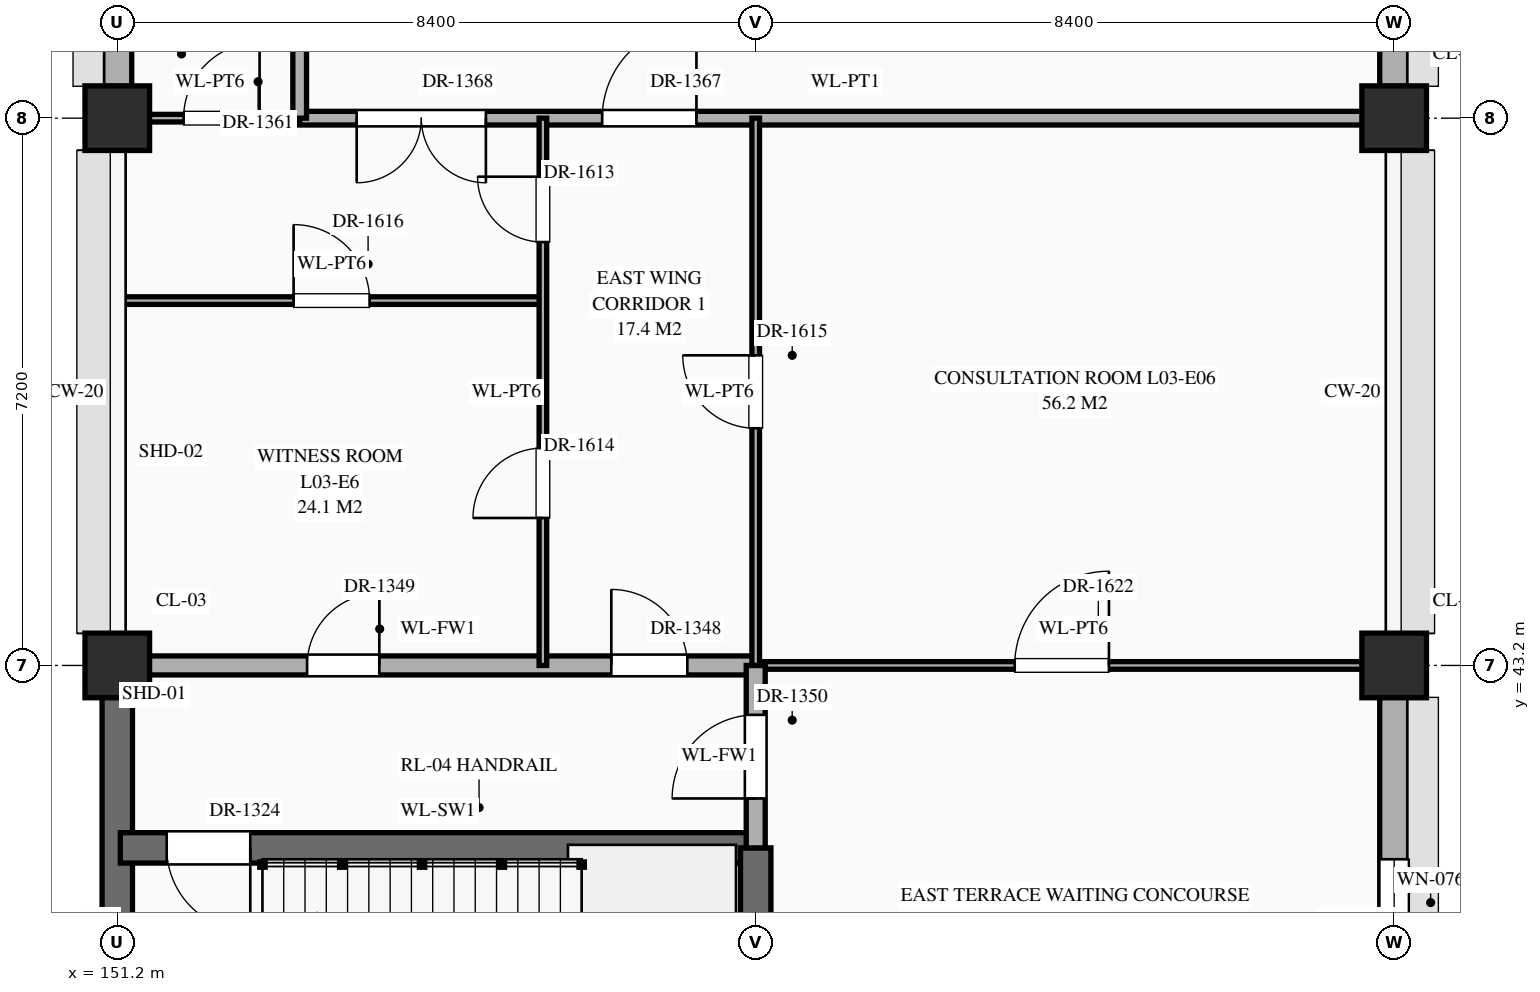
"""IFC4 building model, lengths in metres.
Left out: names, types, materials, properties, quantities, classifications, styles, units other than length and angle.
Written with IfcOpenShell. Run it as: python <this file> out.ifc"""

import sys

from ifc_helpers import new_model, si_unit, direction, frame, frame_2d, origin, origin_2d, place, context, subcontext, project, spatial, rectangle, extrude, element, fill, save


model = new_model("IFC4")
c1 = context("Model", 3, precision=1e-05, world=origin(), true_north=direction((0.0, 1.0)))
c2 = subcontext(c1, "Body", "Model", "MODEL_VIEW")
j1 = project(units=[si_unit("LENGTHUNIT", "METRE"), si_unit("PLANEANGLEUNIT", "RADIAN")], contexts=[c1])
p1 = place(None, origin())
s1 = spatial("IfcSite", under=j1, at=p1, CompositionType="ELEMENT")
p2 = place(p1, origin())
s2 = spatial("IfcBuilding", under=s1, at=p2, CompositionType="ELEMENT")
p3 = place(p2, frame((0.0, 0.0, 10.8)))
s3 = spatial("IfcBuildingStorey", under=s2, at=p3, CompositionType="ELEMENT", Elevation=10.8)
for number, where, z_axis, x_axis in (
    (1, (151.2, 43.2, 0.0), (0.0, 0.0, 1.0), (1.0, 0.0, 0.0)),
    (2, (151.2, 50.4, 0.0), (0.0, 0.0, 1.0), (1.0, 0.0, 0.0)),
    (3, (168.0, 43.2, 0.0), (0.0, 0.0, 1.0), (1.0, 0.0, 0.0)),
    (4, (168.0, 50.4, 0.0), (0.0, 0.0, 1.0), (1.0, 0.0, 0.0)),
):
    element("IfcColumn", number, at=place(p3, frame(where, z_axis=z_axis, x_axis=x_axis)), inside=s3, PredefinedType="COLUMN", context=c2, shape_type="SweptSolid", body=[
        extrude(rectangle(XDim=0.85, YDim=0.85, at=origin_2d()), origin(), (0.0, 0.0, 1.0), 5.4),
    ])
p4 = place(p3, frame((151.2, 36.42, 0.0), z_axis=(0.0, 0.0, 1.0), x_axis=(0.0, 1.0, 0.0)))
e5 = element("IfcWall", 5, at=p4, inside=s3, PredefinedType="SHEAR", context=c2, shape_type="SweptSolid", body=[
    extrude(rectangle(XDim=6.36, YDim=0.4, at=frame_2d((3.18, 0.0))), origin(), (0.0, 0.0, 1.0), 5.12),
])
p5 = place(p3, frame((151.2, 50.82, 0.0), z_axis=(0.0, 0.0, 1.0), x_axis=(0.0, 1.0, 0.0)))
e6 = element("IfcWall", 6, at=p5, inside=s3, PredefinedType="STANDARD", context=c2, shape_type="SweptSolid", body=[
    extrude(rectangle(XDim=6.36, YDim=0.38, at=frame_2d((3.18, 0.0))), origin(), (0.0, 0.0, 1.0), 4.47),
])
p6 = place(p5, frame((2.73, 0.0, 0.85)))
e7 = element("IfcOpeningElement", 7, at=p6, cuts=e6, PredefinedType="OPENING", context=c2, shape_type="SweptSolid", body=[
    extrude(rectangle(XDim=0.9, YDim=1.56, at=frame_2d((0.45, 0.78))), frame((0.0, 0.202, 0.0), z_axis=(0.0, -1.0, 0.0), x_axis=(1.0, 0.0, 0.0)), (0.0, 0.0, 1.0), 0.404),
])
p7 = place(p3, frame((168.0, 36.42, 0.0), z_axis=(0.0, 0.0, 1.0), x_axis=(0.0, 1.0, 0.0)))
e8 = element("IfcWall", 8, at=p7, inside=s3, PredefinedType="STANDARD", context=c2, shape_type="SweptSolid", body=[
    extrude(rectangle(XDim=6.36, YDim=0.38, at=frame_2d((3.18, 0.0))), origin(), (0.0, 0.0, 1.0), 4.47),
])
p8 = place(p7, frame((2.13, 0.0, 0.85)))
e9 = element("IfcOpeningElement", 9, at=p8, cuts=e8, PredefinedType="OPENING", context=c2, shape_type="SweptSolid", body=[
    extrude(rectangle(XDim=2.1, YDim=1.92, at=frame_2d((1.05, 0.96))), frame((0.0, 0.202, 0.0), z_axis=(0.0, -1.0, 0.0), x_axis=(1.0, 0.0, 0.0)), (0.0, 0.0, 1.0), 0.404),
])
p9 = place(p3, frame((168.0, 50.82, 0.0), z_axis=(0.0, 0.0, 1.0), x_axis=(0.0, 1.0, 0.0)))
e10 = element("IfcWall", 10, at=p9, inside=s3, PredefinedType="STANDARD", context=c2, shape_type="SweptSolid", body=[
    extrude(rectangle(XDim=6.36, YDim=0.38, at=frame_2d((3.18, 0.0))), origin(), (0.0, 0.0, 1.0), 4.47),
])
p10 = place(p9, frame((2.73, 0.0, 0.85)))
e11 = element("IfcOpeningElement", 11, at=p10, cuts=e10, PredefinedType="OPENING", context=c2, shape_type="SweptSolid", body=[
    extrude(rectangle(XDim=0.9, YDim=1.2, at=frame_2d((0.45, 0.6))), frame((0.0, 0.202, 0.0), z_axis=(0.0, -1.0, 0.0), x_axis=(1.0, 0.0, 0.0)), (0.0, 0.0, 1.0), 0.404),
])
p11 = place(p3, frame((151.24, 40.8, 0.0), z_axis=(0.0, 0.0, 1.0), x_axis=(1.0, 0.0, 0.0)))
e12 = element("IfcWall", 12, at=p11, inside=s3, PredefinedType="SHEAR", context=c2, shape_type="SweptSolid", body=[
    extrude(rectangle(XDim=8.36, YDim=0.4, at=frame_2d((4.18, 0.0))), origin(), (0.0, 0.0, 1.0), 5.12),
])
p12 = place(p11, frame((0.61, 0.0, 0.0)))
e13 = element("IfcOpeningElement", 13, at=p12, cuts=e12, PredefinedType="OPENING", context=c2, shape_type="SweptSolid", body=[
    extrude(rectangle(XDim=1.1, YDim=2.2, at=frame_2d((0.55, 1.1))), frame((0.0, 0.212, 0.0), z_axis=(0.0, -1.0, 0.0), x_axis=(1.0, 0.0, 0.0)), (0.0, 0.0, 1.0), 0.424),
])
p13 = place(p3, frame((151.24, 43.2, 0.0), z_axis=(0.0, 0.0, 1.0), x_axis=(1.0, 0.0, 0.0)))
e14 = element("IfcWall", 14, at=p13, inside=s3, PredefinedType="STANDARD", context=c2, shape_type="SweptSolid", body=[
    extrude(rectangle(XDim=8.36, YDim=0.25, at=frame_2d((4.18, 0.0))), origin(), (0.0, 0.0, 1.0), 4.07),
])
p14 = place(p13, frame((6.46, 0.0, 0.0)))
e15 = element("IfcOpeningElement", 15, at=p14, cuts=e14, PredefinedType="OPENING", context=c2, shape_type="SweptSolid", body=[
    extrude(rectangle(XDim=1.0, YDim=2.2, at=frame_2d((0.5, 1.1))), frame((0.0, 0.137, 0.0), z_axis=(0.0, -1.0, 0.0), x_axis=(1.0, 0.0, 0.0)), (0.0, 0.0, 1.0), 0.274),
])
p15 = place(p13, frame((2.458, 0.0, 0.0)))
e16 = element("IfcOpeningElement", 16, at=p15, cuts=e14, PredefinedType="OPENING", context=c2, shape_type="SweptSolid", body=[
    extrude(rectangle(XDim=0.95, YDim=2.15, at=frame_2d((0.475, 1.075))), frame((0.0, 0.137, 0.0), z_axis=(0.0, -1.0, 0.0), x_axis=(1.0, 0.0, 0.0)), (0.0, 0.0, 1.0), 0.274),
])
p16 = place(p3, frame((159.6, 43.2, 0.0), z_axis=(0.0, 0.0, 1.0), x_axis=(1.0, 0.0, 0.0)))
e17 = element("IfcWall", 17, at=p16, inside=s3, PredefinedType="STANDARD", context=c2, shape_type="SweptSolid", body=[
    extrude(rectangle(XDim=8.36, YDim=0.1, at=frame_2d((4.18, 0.0))), origin(), (0.0, 0.0, 1.0), 4.07),
])
p17 = place(p16, frame((3.407, 0.0, 0.0)))
e18 = element("IfcOpeningElement", 18, at=p17, cuts=e17, PredefinedType="OPENING", context=c2, shape_type="SweptSolid", body=[
    extrude(rectangle(XDim=1.24, YDim=2.3, at=frame_2d((0.62, 1.15))), frame((0.0, 0.062, 0.0), z_axis=(0.0, -1.0, 0.0), x_axis=(1.0, 0.0, 0.0)), (0.0, 0.0, 1.0), 0.124),
])
p18 = place(p3, frame((151.24, 48.0, 0.0), z_axis=(0.0, 0.0, 1.0), x_axis=(1.0, 0.0, 0.0)))
e19 = element("IfcWall", 19, at=p18, inside=s3, PredefinedType="STANDARD", context=c2, shape_type="SweptSolid", body=[
    extrude(rectangle(XDim=5.56, YDim=0.1, at=frame_2d((2.78, 0.0))), origin(), (0.0, 0.0, 1.0), 5.12),
])
p19 = place(p18, frame((2.28, 0.0, 0.0)))
e20 = element("IfcOpeningElement", 20, at=p19, cuts=e19, PredefinedType="OPENING", context=c2, shape_type="SweptSolid", body=[
    extrude(rectangle(XDim=1.0, YDim=2.25, at=frame_2d((0.5, 1.125))), frame((0.0, 0.062, 0.0), z_axis=(0.0, -1.0, 0.0), x_axis=(1.0, 0.0, 0.0)), (0.0, 0.0, 1.0), 0.124),
])
p20 = place(p3, frame((151.24, 50.4, 0.0), z_axis=(0.0, 0.0, 1.0), x_axis=(1.0, 0.0, 0.0)))
e21 = element("IfcWall", 21, at=p20, inside=s3, PredefinedType="STANDARD", context=c2, shape_type="SweptSolid", body=[
    extrude(rectangle(XDim=2.36, YDim=0.1, at=frame_2d((1.18, 0.0))), origin(), (0.0, 0.0, 1.0), 4.07),
])
p21 = place(p20, frame((0.833, 0.0, 0.0)))
e22 = element("IfcOpeningElement", 22, at=p21, cuts=e21, PredefinedType="OPENING", context=c2, shape_type="SweptSolid", body=[
    extrude(rectangle(XDim=1.0, YDim=2.25, at=frame_2d((0.5, 1.125))), frame((0.0, 0.062, 0.0), z_axis=(0.0, -1.0, 0.0), x_axis=(1.0, 0.0, 0.0)), (0.0, 0.0, 1.0), 0.124),
])
p22 = place(p3, frame((153.6, 50.4, 0.0), z_axis=(0.0, 0.0, 1.0), x_axis=(1.0, 0.0, 0.0)))
e23 = element("IfcWall", 23, at=p22, inside=s3, PredefinedType="STANDARD", context=c2, shape_type="SweptSolid", body=[
    extrude(rectangle(XDim=14.36, YDim=0.18, at=frame_2d((7.18, 0.0))), origin(), (0.0, 0.0, 1.0), 4.07),
])
p23 = place(p22, frame((3.98, 0.0, 0.0)))
e24 = element("IfcOpeningElement", 24, at=p23, cuts=e23, PredefinedType="OPENING", context=c2, shape_type="SweptSolid", body=[
    extrude(rectangle(XDim=1.24, YDim=2.3, at=frame_2d((0.62, 1.15))), frame((0.0, 0.102, 0.0), z_axis=(0.0, -1.0, 0.0), x_axis=(1.0, 0.0, 0.0)), (0.0, 0.0, 1.0), 0.204),
])
p24 = place(p22, frame((0.75, 0.0, 0.0)))
e25 = element("IfcOpeningElement", 25, at=p24, cuts=e23, PredefinedType="OPENING", context=c2, shape_type="SweptSolid", body=[
    extrude(rectangle(XDim=1.7, YDim=2.45, at=frame_2d((0.85, 1.225))), frame((0.0, 0.102, 0.0), z_axis=(0.0, -1.0, 0.0), x_axis=(1.0, 0.0, 0.0)), (0.0, 0.0, 1.0), 0.204),
])
p25 = place(p3, frame((153.6, 50.4, 0.0), z_axis=(0.0, 0.0, 1.0), x_axis=(0.0, 1.0, 0.0)))
e26 = element("IfcWall", 26, at=p25, inside=s3, PredefinedType="STANDARD", context=c2, shape_type="SweptSolid", body=[
    extrude(rectangle(XDim=14.4, YDim=0.18, at=frame_2d((7.2, 0.0))), origin(), (0.0, 0.0, 1.0), 5.12),
])
p26 = place(p25, frame((6.375, 0.0, 0.0)))
e27 = element("IfcOpeningElement", 27, at=p26, cuts=e26, PredefinedType="OPENING", context=c2, shape_type="SweptSolid", body=[
    extrude(rectangle(XDim=1.65, YDim=2.4, at=frame_2d((0.825, 1.2))), frame((0.0, 0.102, 0.0), z_axis=(0.0, -1.0, 0.0), x_axis=(1.0, 0.0, 0.0)), (0.0, 0.0, 1.0), 0.204),
])
p27 = place(p3, frame((156.8, 43.2, 0.0), z_axis=(0.0, 0.0, 1.0), x_axis=(0.0, 1.0, 0.0)))
e28 = element("IfcWall", 28, at=p27, inside=s3, PredefinedType="STANDARD", context=c2, shape_type="SweptSolid", body=[
    extrude(rectangle(XDim=7.2, YDim=0.1, at=frame_2d((3.6, 0.0))), origin(), (0.0, 0.0, 1.0), 5.12),
])
p28 = place(p27, frame((5.57, 0.0, 0.0)))
e29 = element("IfcOpeningElement", 29, at=p28, cuts=e28, PredefinedType="OPENING", context=c2, shape_type="SweptSolid", body=[
    extrude(rectangle(XDim=0.86, YDim=2.1, at=frame_2d((0.43, 1.05))), frame((0.0, 0.062, 0.0), z_axis=(0.0, -1.0, 0.0), x_axis=(1.0, 0.0, 0.0)), (0.0, 0.0, 1.0), 0.124),
])
p29 = place(p27, frame((1.94, 0.0, 0.0)))
e30 = element("IfcOpeningElement", 30, at=p29, cuts=e28, PredefinedType="OPENING", context=c2, shape_type="SweptSolid", body=[
    extrude(rectangle(XDim=0.92, YDim=2.15, at=frame_2d((0.46, 1.075))), frame((0.0, 0.062, 0.0), z_axis=(0.0, -1.0, 0.0), x_axis=(1.0, 0.0, 0.0)), (0.0, 0.0, 1.0), 0.124),
])
p30 = place(p3, frame((159.6, 36.04, 0.0), z_axis=(0.0, 0.0, 1.0), x_axis=(0.0, 1.0, 0.0)))
e31 = element("IfcWall", 31, at=p30, inside=s3, PredefinedType="SHEAR", context=c2, shape_type="SweptSolid", body=[
    extrude(rectangle(XDim=4.76, YDim=0.4, at=frame_2d((2.38, 0.0))), origin(), (0.0, 0.0, 1.0), 5.12),
])
p31 = place(p3, frame((159.6, 40.8, 0.0), z_axis=(0.0, 0.0, 1.0), x_axis=(0.0, 1.0, 0.0)))
e32 = element("IfcWall", 32, at=p31, inside=s3, PredefinedType="STANDARD", context=c2, shape_type="SweptSolid", body=[
    extrude(rectangle(XDim=2.4, YDim=0.25, at=frame_2d((1.2, 0.0))), origin(), (0.0, 0.0, 1.0), 5.12),
])
p32 = place(p31, frame((0.65, 0.0, 0.0)))
e33 = element("IfcOpeningElement", 33, at=p32, cuts=e32, PredefinedType="OPENING", context=c2, shape_type="SweptSolid", body=[
    extrude(rectangle(XDim=1.1, YDim=2.2, at=frame_2d((0.55, 1.1))), frame((0.0, 0.137, 0.0), z_axis=(0.0, -1.0, 0.0), x_axis=(1.0, 0.0, 0.0)), (0.0, 0.0, 1.0), 0.274),
])
p33 = place(p3, frame((159.6, 43.2, 0.0), z_axis=(0.0, 0.0, 1.0), x_axis=(0.0, 1.0, 0.0)))
e34 = element("IfcWall", 34, at=p33, inside=s3, PredefinedType="STANDARD", context=c2, shape_type="SweptSolid", body=[
    extrude(rectangle(XDim=7.2, YDim=0.1, at=frame_2d((3.6, 0.0))), origin(), (0.0, 0.0, 1.0), 5.12),
])
p34 = place(p33, frame((3.12, 0.0, 0.0)))
e35 = element("IfcOpeningElement", 35, at=p34, cuts=e34, PredefinedType="OPENING", context=c2, shape_type="SweptSolid", body=[
    extrude(rectangle(XDim=0.96, YDim=2.2, at=frame_2d((0.48, 1.1))), frame((0.0, 0.062, 0.0), z_axis=(0.0, -1.0, 0.0), x_axis=(1.0, 0.0, 0.0)), (0.0, 0.0, 1.0), 0.124),
])
p35 = place(p8, origin())
e36 = element("IfcWindow", 36, at=p35, inside=s3, PartitioningType="SINGLE_PANEL", PredefinedType="WINDOW", context=c2, shape_type="SweptSolid", body=[
    extrude(rectangle(XDim=2.1, YDim=1.92, at=frame_2d((1.05, 0.96))), frame((0.0, 0.03, 0.0), z_axis=(0.0, -1.0, 0.0), x_axis=(1.0, 0.0, 0.0)), (0.0, 0.0, 1.0), 0.06),
])
fill(e9, e36)
p36 = place(p12, frame((1.1, 0.0, 0.0), z_axis=(0.0, 0.0, 1.0), x_axis=(-1.0, 0.0, 0.0)))
e37 = element("IfcDoor", 37, at=p36, inside=s3, OperationType="SINGLE_SWING_LEFT", PredefinedType="DOOR", context=c2, shape_type="SweptSolid", body=[
    extrude(rectangle(XDim=1.1, YDim=2.2, at=frame_2d((0.55, 1.1))), frame((0.0, 0.025, 0.0), z_axis=(0.0, -1.0, 0.0), x_axis=(1.0, 0.0, 0.0)), (0.0, 0.0, 1.0), 0.05),
])
fill(e13, e37)
p37 = place(p14, origin())
e38 = element("IfcDoor", 38, at=p37, inside=s3, OperationType="SINGLE_SWING_LEFT", PredefinedType="DOOR", context=c2, shape_type="SweptSolid", body=[
    extrude(rectangle(XDim=1.0, YDim=2.2, at=frame_2d((0.5, 1.1))), frame((0.0, 0.025, 0.0), z_axis=(0.0, -1.0, 0.0), x_axis=(1.0, 0.0, 0.0)), (0.0, 0.0, 1.0), 0.05),
])
fill(e15, e38)
p38 = place(p15, origin())
e39 = element("IfcDoor", 39, at=p38, inside=s3, OperationType="SINGLE_SWING_RIGHT", PredefinedType="DOOR", context=c2, shape_type="SweptSolid", body=[
    extrude(rectangle(XDim=0.95, YDim=2.15, at=frame_2d((0.475, 1.075))), frame((0.0, 0.025, 0.0), z_axis=(0.0, -1.0, 0.0), x_axis=(1.0, 0.0, 0.0)), (0.0, 0.0, 1.0), 0.05),
])
fill(e16, e39)
p39 = place(p32, origin())
e40 = element("IfcDoor", 40, at=p39, inside=s3, OperationType="SINGLE_SWING_LEFT", PredefinedType="DOOR", context=c2, shape_type="SweptSolid", body=[
    extrude(rectangle(XDim=1.1, YDim=2.2, at=frame_2d((0.55, 1.1))), frame((0.0, 0.025, 0.0), z_axis=(0.0, -1.0, 0.0), x_axis=(1.0, 0.0, 0.0)), (0.0, 0.0, 1.0), 0.05),
])
fill(e33, e40)
p40 = place(p21, origin())
e41 = element("IfcDoor", 41, at=p40, inside=s3, OperationType="SINGLE_SWING_RIGHT", PredefinedType="DOOR", context=c2, shape_type="SweptSolid", body=[
    extrude(rectangle(XDim=1.0, YDim=2.25, at=frame_2d((0.5, 1.125))), frame((0.0, 0.025, 0.0), z_axis=(0.0, -1.0, 0.0), x_axis=(1.0, 0.0, 0.0)), (0.0, 0.0, 1.0), 0.05),
])
fill(e22, e41)
p41 = place(p23, origin())
e42 = element("IfcDoor", 42, at=p41, inside=s3, OperationType="SINGLE_SWING_RIGHT", PredefinedType="DOOR", context=c2, shape_type="SweptSolid", body=[
    extrude(rectangle(XDim=1.24, YDim=2.3, at=frame_2d((0.62, 1.15))), frame((0.0, 0.025, 0.0), z_axis=(0.0, -1.0, 0.0), x_axis=(1.0, 0.0, 0.0)), (0.0, 0.0, 1.0), 0.05),
])
fill(e24, e42)
p42 = place(p24, frame((1.7, 0.0, 0.0), z_axis=(0.0, 0.0, 1.0), x_axis=(-1.0, 0.0, 0.0)))
e43 = element("IfcDoor", 43, at=p42, inside=s3, OperationType="DOUBLE_DOOR_SINGLE_SWING", PredefinedType="DOOR", context=c2, shape_type="SweptSolid", body=[
    extrude(rectangle(XDim=1.7, YDim=2.45, at=frame_2d((0.85, 1.225))), frame((0.0, 0.025, 0.0), z_axis=(0.0, -1.0, 0.0), x_axis=(1.0, 0.0, 0.0)), (0.0, 0.0, 1.0), 0.05),
])
fill(e25, e43)
p43 = place(p28, origin())
e44 = element("IfcDoor", 44, at=p43, inside=s3, OperationType="SINGLE_SWING_RIGHT", PredefinedType="DOOR", context=c2, shape_type="SweptSolid", body=[
    extrude(rectangle(XDim=0.86, YDim=2.1, at=frame_2d((0.43, 1.05))), frame((0.0, 0.025, 0.0), z_axis=(0.0, -1.0, 0.0), x_axis=(1.0, 0.0, 0.0)), (0.0, 0.0, 1.0), 0.05),
])
fill(e29, e44)
p44 = place(p29, origin())
e45 = element("IfcDoor", 45, at=p44, inside=s3, OperationType="SINGLE_SWING_LEFT", PredefinedType="DOOR", context=c2, shape_type="SweptSolid", body=[
    extrude(rectangle(XDim=0.92, YDim=2.15, at=frame_2d((0.46, 1.075))), frame((0.0, 0.025, 0.0), z_axis=(0.0, -1.0, 0.0), x_axis=(1.0, 0.0, 0.0)), (0.0, 0.0, 1.0), 0.05),
])
fill(e30, e45)
p45 = place(p34, origin())
e46 = element("IfcDoor", 46, at=p45, inside=s3, OperationType="SINGLE_SWING_RIGHT", PredefinedType="DOOR", context=c2, shape_type="SweptSolid", body=[
    extrude(rectangle(XDim=0.96, YDim=2.2, at=frame_2d((0.48, 1.1))), frame((0.0, 0.025, 0.0), z_axis=(0.0, -1.0, 0.0), x_axis=(1.0, 0.0, 0.0)), (0.0, 0.0, 1.0), 0.05),
])
fill(e35, e46)
p46 = place(p19, origin())
e47 = element("IfcDoor", 47, at=p46, inside=s3, OperationType="SINGLE_SWING_LEFT", PredefinedType="DOOR", context=c2, shape_type="SweptSolid", body=[
    extrude(rectangle(XDim=1.0, YDim=2.25, at=frame_2d((0.5, 1.125))), frame((0.0, 0.025, 0.0), z_axis=(0.0, -1.0, 0.0), x_axis=(1.0, 0.0, 0.0)), (0.0, 0.0, 1.0), 0.05),
])
fill(e20, e47)
p47 = place(p17, origin())
e48 = element("IfcDoor", 48, at=p47, inside=s3, OperationType="SINGLE_SWING_RIGHT", PredefinedType="DOOR", context=c2, shape_type="SweptSolid", body=[
    extrude(rectangle(XDim=1.24, YDim=2.3, at=frame_2d((0.62, 1.15))), frame((0.0, 0.025, 0.0), z_axis=(0.0, -1.0, 0.0), x_axis=(1.0, 0.0, 0.0)), (0.0, 0.0, 1.0), 0.05),
])
fill(e18, e48)
save(model, sys.argv[1])
